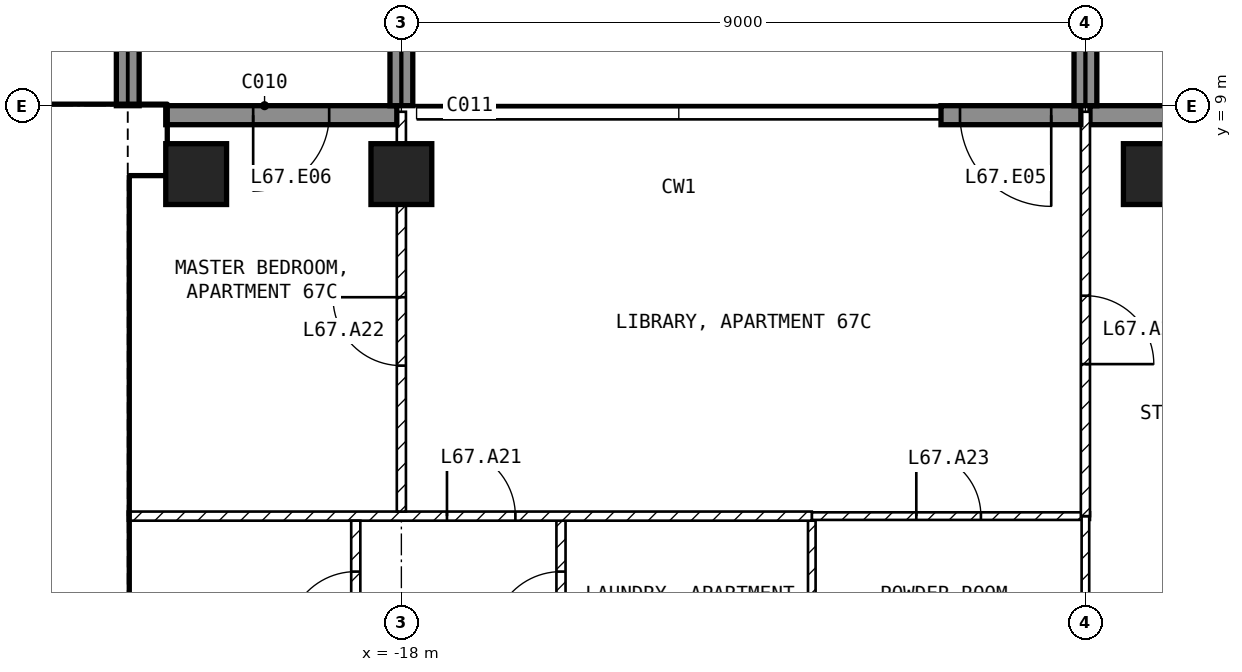
"""IFC4 building model, lengths in metres.
Left out: names, types, materials, properties, quantities, classifications, styles, units other than length and angle.
Written with IfcOpenShell. Run it as: python <this file> out.ifc"""

import sys

from ifc_helpers import new_model, si_unit, direction, frame, frame_2d, origin, origin_2d, place, context, subcontext, project, spatial, rectangle, extrude, element, fill, save


model = new_model("IFC4")
c1 = context("Model", 3, precision=1e-05, world=origin(), true_north=direction((0.0, 1.0)))
c2 = subcontext(c1, "Body", "Model", "MODEL_VIEW")
j1 = project(units=[si_unit("LENGTHUNIT", "METRE"), si_unit("PLANEANGLEUNIT", "RADIAN")], contexts=[c1])
p1 = place(None, origin())
s1 = spatial("IfcSite", under=j1, at=p1, CompositionType="ELEMENT")
p2 = place(p1, origin())
s2 = spatial("IfcBuilding", under=s1, at=p2, CompositionType="ELEMENT")
p3 = place(p2, frame((0.0, 0.0, 264.0)))
s3 = spatial("IfcBuildingStorey", under=s2, at=p3, CompositionType="ELEMENT", Elevation=264.0)
for number, where, z_axis, x_axis in (
    (1, (-20.7, 8.1, -0.25), (0.0, 0.0, 1.0), (1.0, 0.0, 0.0)),
    (2, (-18.0, 8.1, -0.25), (0.0, 0.0, 1.0), (1.0, 0.0, 0.0)),
    (3, (-8.1, 8.1, -0.25), (0.0, 0.0, 1.0), (1.0, 0.0, 0.0)),
):
    element("IfcColumn", number, at=place(p3, frame(where, z_axis=z_axis, x_axis=x_axis)), inside=s3, PredefinedType="COLUMN", context=c2, shape_type="SweptSolid", body=[
        extrude(rectangle(XDim=0.8, YDim=0.8, at=origin_2d()), origin(), (0.0, 0.0, 1.0), 3.5),
    ])
p4 = place(p3, frame((-5.9, 8.875, 0.0), z_axis=(0.0, 0.0, 1.0), x_axis=(-1.0, 0.0, 0.0)))
e4 = element("IfcWall", 4, at=p4, inside=s3, PredefinedType="SOLIDWALL", context=c2, shape_type="SweptSolid", body=[
    extrude(rectangle(XDim=3.04, YDim=0.25, at=frame_2d((1.52, 0.0))), origin(), (0.0, 0.0, 1.0), 3.25),
])
p5 = place(p4, frame((0.25, 0.0, 0.0)))
e5 = element("IfcOpeningElement", 5, at=p5, cuts=e4, PredefinedType="OPENING", context=c2, shape_type="SweptSolid", body=[
    extrude(rectangle(XDim=1.2, YDim=2.4, at=frame_2d((0.6, 1.2))), frame((0.0, 0.135, 0.0), z_axis=(0.0, -1.0, 0.0), x_axis=(1.0, 0.0, 0.0)), (0.0, 0.0, 1.0), 0.27),
])
p6 = place(p3, frame((-9.06, 8.875, 0.0), z_axis=(0.0, 0.0, 1.0), x_axis=(-1.0, 0.0, 0.0)))
e6 = element("IfcWall", 6, at=p6, inside=s3, PredefinedType="SOLIDWALL", context=c2, shape_type="SweptSolid", body=[
    extrude(rectangle(XDim=1.84, YDim=0.25, at=frame_2d((0.92, 0.0))), origin(), (0.0, 0.0, 1.0), 3.25),
])
p7 = place(p6, frame((0.39, 0.0, 0.0)))
e7 = element("IfcOpeningElement", 7, at=p7, cuts=e6, PredefinedType="OPENING", context=c2, shape_type="SweptSolid", body=[
    extrude(rectangle(XDim=1.2, YDim=2.4, at=frame_2d((0.6, 1.2))), frame((0.0, 0.135, 0.0), z_axis=(0.0, -1.0, 0.0), x_axis=(1.0, 0.0, 0.0)), (0.0, 0.0, 1.0), 0.27),
])
p8 = place(p3, frame((-18.06, 8.875, 0.0), z_axis=(0.0, 0.0, 1.0), x_axis=(-1.0, 0.0, 0.0)))
e8 = element("IfcWall", 8, at=p8, inside=s3, PredefinedType="SOLIDWALL", context=c2, shape_type="SweptSolid", body=[
    extrude(rectangle(XDim=3.04, YDim=0.25, at=frame_2d((1.52, 0.0))), origin(), (0.0, 0.0, 1.0), 3.25),
])
p9 = place(p8, frame((0.89, 0.0, 0.0)))
e9 = element("IfcOpeningElement", 9, at=p9, cuts=e8, PredefinedType="OPENING", context=c2, shape_type="SweptSolid", body=[
    extrude(rectangle(XDim=1.0, YDim=2.4, at=frame_2d((0.5, 1.2))), frame((0.0, 0.135, 0.0), z_axis=(0.0, -1.0, 0.0), x_axis=(1.0, 0.0, 0.0)), (0.0, 0.0, 1.0), 0.27),
])
for number, where, z_axis, x_axis in (
    (10, (-21.6, 9.0, 0.0), (0.0, 0.0, 1.0), (0.0, 1.0, 0.0)),
    (11, (-18.0, 9.0, 0.0), (0.0, 0.0, 1.0), (0.0, 1.0, 0.0)),
    (12, (-9.0, 9.0, 0.0), (0.0, 0.0, 1.0), (0.0, 1.0, 0.0)),
):
    element("IfcWall", number, at=place(p3, frame(where, z_axis=z_axis, x_axis=x_axis)), inside=s3, PredefinedType="SOLIDWALL", context=c2, shape_type="SweptSolid", body=[
        extrude(rectangle(XDim=2.7, YDim=0.3, at=frame_2d((1.35, 0.0))), origin(), (0.0, 0.0, 1.0), 3.25),
    ])
p10 = place(p3, frame((-29.75, 8.55, 0.0), z_axis=(0.0, 0.0, 1.0), x_axis=(1.0, 0.0, 0.0)))
e13 = element("IfcWall", 13, at=p10, inside=s3, PredefinedType="SHEAR", context=c2, shape_type="SweptSolid", body=[
    extrude(rectangle(XDim=8.65, YDim=0.9, at=frame_2d((4.325, 0.0))), origin(), (0.0, 0.0, 1.0), 3.25),
])
p11 = place(p3, frame((-21.825, 1.2, 0.0), z_axis=(0.0, 0.0, 1.0), x_axis=(0.0, 1.0, 0.0)))
e14 = element("IfcWall", 14, at=p11, inside=s3, PredefinedType="SHEAR", context=c2, shape_type="SweptSolid", body=[
    extrude(rectangle(XDim=6.9, YDim=0.45, at=frame_2d((3.45, 0.0))), origin(), (0.0, 0.0, 1.0), 3.25),
])
p12 = place(p3, frame((-28.35, 5.15, 0.0), z_axis=(0.0, 0.0, 1.0), x_axis=(1.0, 0.0, 0.0)))
e15 = element("IfcWall", 15, at=p12, inside=s3, PredefinedType="SOLIDWALL", context=c2, shape_type="SweptSolid", body=[
    extrude(rectangle(XDim=6.3, YDim=0.2, at=frame_2d((3.15, 0.0))), origin(), (0.0, 0.0, 1.0), 3.25),
])
p13 = place(p12, frame((5.1, 0.0, 0.0)))
e16 = element("IfcOpeningElement", 16, at=p13, cuts=e15, PredefinedType="OPENING", context=c2, shape_type="SweptSolid", body=[
    extrude(rectangle(XDim=1.0, YDim=2.1, at=frame_2d((0.5, 1.05))), frame((0.0, 0.11, 0.0), z_axis=(0.0, -1.0, 0.0), x_axis=(1.0, 0.0, 0.0)), (0.0, 0.0, 1.0), 0.22),
])
p14 = place(p3, frame((-12.6, 1.3, 0.0), z_axis=(0.0, 0.0, 1.0), x_axis=(0.0, 1.0, 0.0)))
e17 = element("IfcWall", 17, at=p14, inside=s3, PredefinedType="PARTITIONING", context=c2, shape_type="SweptSolid", body=[
    extrude(rectangle(XDim=2.24, YDim=0.1, at=frame_2d((1.12, 0.0))), origin(), (0.0, 0.0, 1.0), 3.25),
])
p15 = place(p3, frame((-12.6, 3.6, 0.0), z_axis=(0.0, 0.0, 1.0), x_axis=(1.0, 0.0, 0.0)))
e18 = element("IfcWall", 18, at=p15, inside=s3, PredefinedType="PARTITIONING", context=c2, shape_type="SweptSolid", body=[
    extrude(rectangle(XDim=3.66, YDim=0.1, at=frame_2d((1.83, 0.0))), origin(), (0.0, 0.0, 1.0), 3.25),
])
p16 = place(p15, frame((1.375, 0.0, 0.0)))
e19 = element("IfcOpeningElement", 19, at=p16, cuts=e18, PredefinedType="OPENING", context=c2, shape_type="SweptSolid", body=[
    extrude(rectangle(XDim=0.85, YDim=2.1, at=frame_2d((0.425, 1.05))), frame((0.0, 0.06, 0.0), z_axis=(0.0, -1.0, 0.0), x_axis=(1.0, 0.0, 0.0)), (0.0, 0.0, 1.0), 0.12),
])
p17 = place(p3, frame((-9.0, 3.6, 0.0), z_axis=(0.0, 0.0, 1.0), x_axis=(0.0, -1.0, 0.0)))
e20 = element("IfcWall", 20, at=p17, inside=s3, PredefinedType="PARTITIONING", context=c2, shape_type="SweptSolid", body=[
    extrude(rectangle(XDim=2.3, YDim=0.1, at=frame_2d((1.15, 0.0))), origin(), (0.0, 0.0, 1.0), 3.25),
])
p18 = place(p3, frame((-15.9, 1.3, 0.0), z_axis=(0.0, 0.0, 1.0), x_axis=(0.0, 1.0, 0.0)))
e21 = element("IfcWall", 21, at=p18, inside=s3, PredefinedType="PARTITIONING", context=c2, shape_type="SweptSolid", body=[
    extrude(rectangle(XDim=2.24, YDim=0.12, at=frame_2d((1.12, 0.0))), origin(), (0.0, 0.0, 1.0), 3.25),
])
p19 = place(p18, frame((0.67, 0.0, 0.0)))
e22 = element("IfcOpeningElement", 22, at=p19, cuts=e21, PredefinedType="OPENING", context=c2, shape_type="SweptSolid", body=[
    extrude(rectangle(XDim=0.9, YDim=2.1, at=frame_2d((0.45, 1.05))), frame((0.0, 0.07, 0.0), z_axis=(0.0, -1.0, 0.0), x_axis=(1.0, 0.0, 0.0)), (0.0, 0.0, 1.0), 0.14),
])
p20 = place(p3, frame((-21.6, 3.6, 0.0), z_axis=(0.0, 0.0, 1.0), x_axis=(1.0, 0.0, 0.0)))
e23 = element("IfcWall", 23, at=p20, inside=s3, PredefinedType="PARTITIONING", context=c2, shape_type="SweptSolid", body=[
    extrude(rectangle(XDim=9.0, YDim=0.12, at=frame_2d((4.5, 0.0))), origin(), (0.0, 0.0, 1.0), 3.25),
])
p21 = place(p20, frame((4.2, 0.0, 0.0)))
e24 = element("IfcOpeningElement", 24, at=p21, cuts=e23, PredefinedType="OPENING", context=c2, shape_type="SweptSolid", body=[
    extrude(rectangle(XDim=0.9, YDim=2.1, at=frame_2d((0.45, 1.05))), frame((0.0, 0.07, 0.0), z_axis=(0.0, -1.0, 0.0), x_axis=(1.0, 0.0, 0.0)), (0.0, 0.0, 1.0), 0.14),
])
p22 = place(p3, frame((-18.6, 1.3, 0.0), z_axis=(0.0, 0.0, 1.0), x_axis=(0.0, 1.0, 0.0)))
e25 = element("IfcWall", 25, at=p22, inside=s3, PredefinedType="PARTITIONING", context=c2, shape_type="SweptSolid", body=[
    extrude(rectangle(XDim=2.24, YDim=0.12, at=frame_2d((1.12, 0.0))), origin(), (0.0, 0.0, 1.0), 3.25),
])
p23 = place(p22, frame((0.67, 0.0, 0.0)))
e26 = element("IfcOpeningElement", 26, at=p23, cuts=e25, PredefinedType="OPENING", context=c2, shape_type="SweptSolid", body=[
    extrude(rectangle(XDim=0.9, YDim=2.1, at=frame_2d((0.45, 1.05))), frame((0.0, 0.07, 0.0), z_axis=(0.0, -1.0, 0.0), x_axis=(1.0, 0.0, 0.0)), (0.0, 0.0, 1.0), 0.14),
])
p24 = place(p3, frame((-18.0, 3.66, 0.0), z_axis=(0.0, 0.0, 1.0), x_axis=(0.0, 1.0, 0.0)))
e27 = element("IfcWall", 27, at=p24, inside=s3, PredefinedType="PARTITIONING", context=c2, shape_type="SweptSolid", body=[
    extrude(rectangle(XDim=5.26, YDim=0.12, at=frame_2d((2.63, 0.0))), origin(), (0.0, 0.0, 1.0), 2.496),
])
p25 = place(p24, frame((1.92, 0.0, 0.0)))
e28 = element("IfcOpeningElement", 28, at=p25, cuts=e27, PredefinedType="OPENING", context=c2, shape_type="SweptSolid", body=[
    extrude(rectangle(XDim=0.9, YDim=2.1, at=frame_2d((0.45, 1.05))), frame((0.0, 0.07, 0.0), z_axis=(0.0, -1.0, 0.0), x_axis=(1.0, 0.0, 0.0)), (0.0, 0.0, 1.0), 0.14),
])
p26 = place(p3, frame((-9.0, 8.92, 0.0), z_axis=(0.0, 0.0, 1.0), x_axis=(0.0, -1.0, 0.0)))
e29 = element("IfcWall", 29, at=p26, inside=s3, PredefinedType="PARTITIONING", context=c2, shape_type="SweptSolid", body=[
    extrude(rectangle(XDim=5.32, YDim=0.12, at=frame_2d((2.66, 0.0))), origin(), (0.0, 0.0, 1.0), 3.25),
])
p27 = place(p26, frame((2.42, 0.0, 0.0)))
e30 = element("IfcOpeningElement", 30, at=p27, cuts=e29, PredefinedType="OPENING", context=c2, shape_type="SweptSolid", body=[
    extrude(rectangle(XDim=0.9, YDim=2.1, at=frame_2d((0.45, 1.05))), frame((0.0, 0.07, 0.0), z_axis=(0.0, -1.0, 0.0), x_axis=(1.0, 0.0, 0.0)), (0.0, 0.0, 1.0), 0.14),
])
p28 = place(p7, origin())
e31 = element("IfcDoor", 31, at=p28, inside=s3, OperationType="SINGLE_SWING_LEFT", PredefinedType="DOOR", context=c2, shape_type="SweptSolid", body=[
    extrude(rectangle(XDim=1.2, YDim=2.4, at=frame_2d((0.6, 1.2))), frame((0.0, 0.025, 0.0), z_axis=(0.0, -1.0, 0.0), x_axis=(1.0, 0.0, 0.0)), (0.0, 0.0, 1.0), 0.05),
])
fill(e7, e31)
p29 = place(p9, origin())
e32 = element("IfcDoor", 32, at=p29, inside=s3, OperationType="SINGLE_SWING_RIGHT", PredefinedType="DOOR", context=c2, shape_type="SweptSolid", body=[
    extrude(rectangle(XDim=1.0, YDim=2.4, at=frame_2d((0.5, 1.2))), frame((0.0, 0.025, 0.0), z_axis=(0.0, -1.0, 0.0), x_axis=(1.0, 0.0, 0.0)), (0.0, 0.0, 1.0), 0.05),
])
fill(e9, e32)
p30 = place(p13, origin())
e33 = element("IfcDoor", 33, at=p30, inside=s3, OperationType="SINGLE_SWING_LEFT", PredefinedType="DOOR", context=c2, shape_type="SweptSolid", body=[
    extrude(rectangle(XDim=1.0, YDim=2.1, at=frame_2d((0.5, 1.05))), frame((0.0, 0.025, 0.0), z_axis=(0.0, -1.0, 0.0), x_axis=(1.0, 0.0, 0.0)), (0.0, 0.0, 1.0), 0.05),
])
fill(e16, e33)
p31 = place(p23, origin())
e34 = element("IfcDoor", 34, at=p31, inside=s3, OperationType="SINGLE_SWING_LEFT", PredefinedType="DOOR", context=c2, shape_type="SweptSolid", body=[
    extrude(rectangle(XDim=0.9, YDim=2.1, at=frame_2d((0.45, 1.05))), frame((0.0, 0.025, 0.0), z_axis=(0.0, -1.0, 0.0), x_axis=(1.0, 0.0, 0.0)), (0.0, 0.0, 1.0), 0.05),
])
fill(e26, e34)
p32 = place(p19, origin())
e35 = element("IfcDoor", 35, at=p32, inside=s3, OperationType="SINGLE_SWING_LEFT", PredefinedType="DOOR", context=c2, shape_type="SweptSolid", body=[
    extrude(rectangle(XDim=0.9, YDim=2.1, at=frame_2d((0.45, 1.05))), frame((0.0, 0.025, 0.0), z_axis=(0.0, -1.0, 0.0), x_axis=(1.0, 0.0, 0.0)), (0.0, 0.0, 1.0), 0.05),
])
fill(e22, e35)
p33 = place(p21, origin())
e36 = element("IfcDoor", 36, at=p33, inside=s3, OperationType="SINGLE_SWING_LEFT", PredefinedType="DOOR", context=c2, shape_type="SweptSolid", body=[
    extrude(rectangle(XDim=0.9, YDim=2.1, at=frame_2d((0.45, 1.05))), frame((0.0, 0.025, 0.0), z_axis=(0.0, -1.0, 0.0), x_axis=(1.0, 0.0, 0.0)), (0.0, 0.0, 1.0), 0.05),
])
fill(e24, e36)
p34 = place(p25, origin())
e37 = element("IfcDoor", 37, at=p34, inside=s3, OperationType="SINGLE_SWING_RIGHT", PredefinedType="DOOR", context=c2, shape_type="SweptSolid", body=[
    extrude(rectangle(XDim=0.9, YDim=2.1, at=frame_2d((0.45, 1.05))), frame((0.0, 0.025, 0.0), z_axis=(0.0, -1.0, 0.0), x_axis=(1.0, 0.0, 0.0)), (0.0, 0.0, 1.0), 0.05),
])
fill(e28, e37)
p35 = place(p16, origin())
e38 = element("IfcDoor", 38, at=p35, inside=s3, OperationType="SINGLE_SWING_LEFT", PredefinedType="DOOR", context=c2, shape_type="SweptSolid", body=[
    extrude(rectangle(XDim=0.85, YDim=2.1, at=frame_2d((0.425, 1.05))), frame((0.0, 0.025, 0.0), z_axis=(0.0, -1.0, 0.0), x_axis=(1.0, 0.0, 0.0)), (0.0, 0.0, 1.0), 0.05),
])
fill(e19, e38)
p36 = place(p27, origin())
e39 = element("IfcDoor", 39, at=p36, inside=s3, OperationType="SINGLE_SWING_RIGHT", PredefinedType="DOOR", context=c2, shape_type="SweptSolid", body=[
    extrude(rectangle(XDim=0.9, YDim=2.1, at=frame_2d((0.45, 1.05))), frame((0.0, 0.025, 0.0), z_axis=(0.0, -1.0, 0.0), x_axis=(1.0, 0.0, 0.0)), (0.0, 0.0, 1.0), 0.05),
])
fill(e30, e39)
save(model, sys.argv[1])
